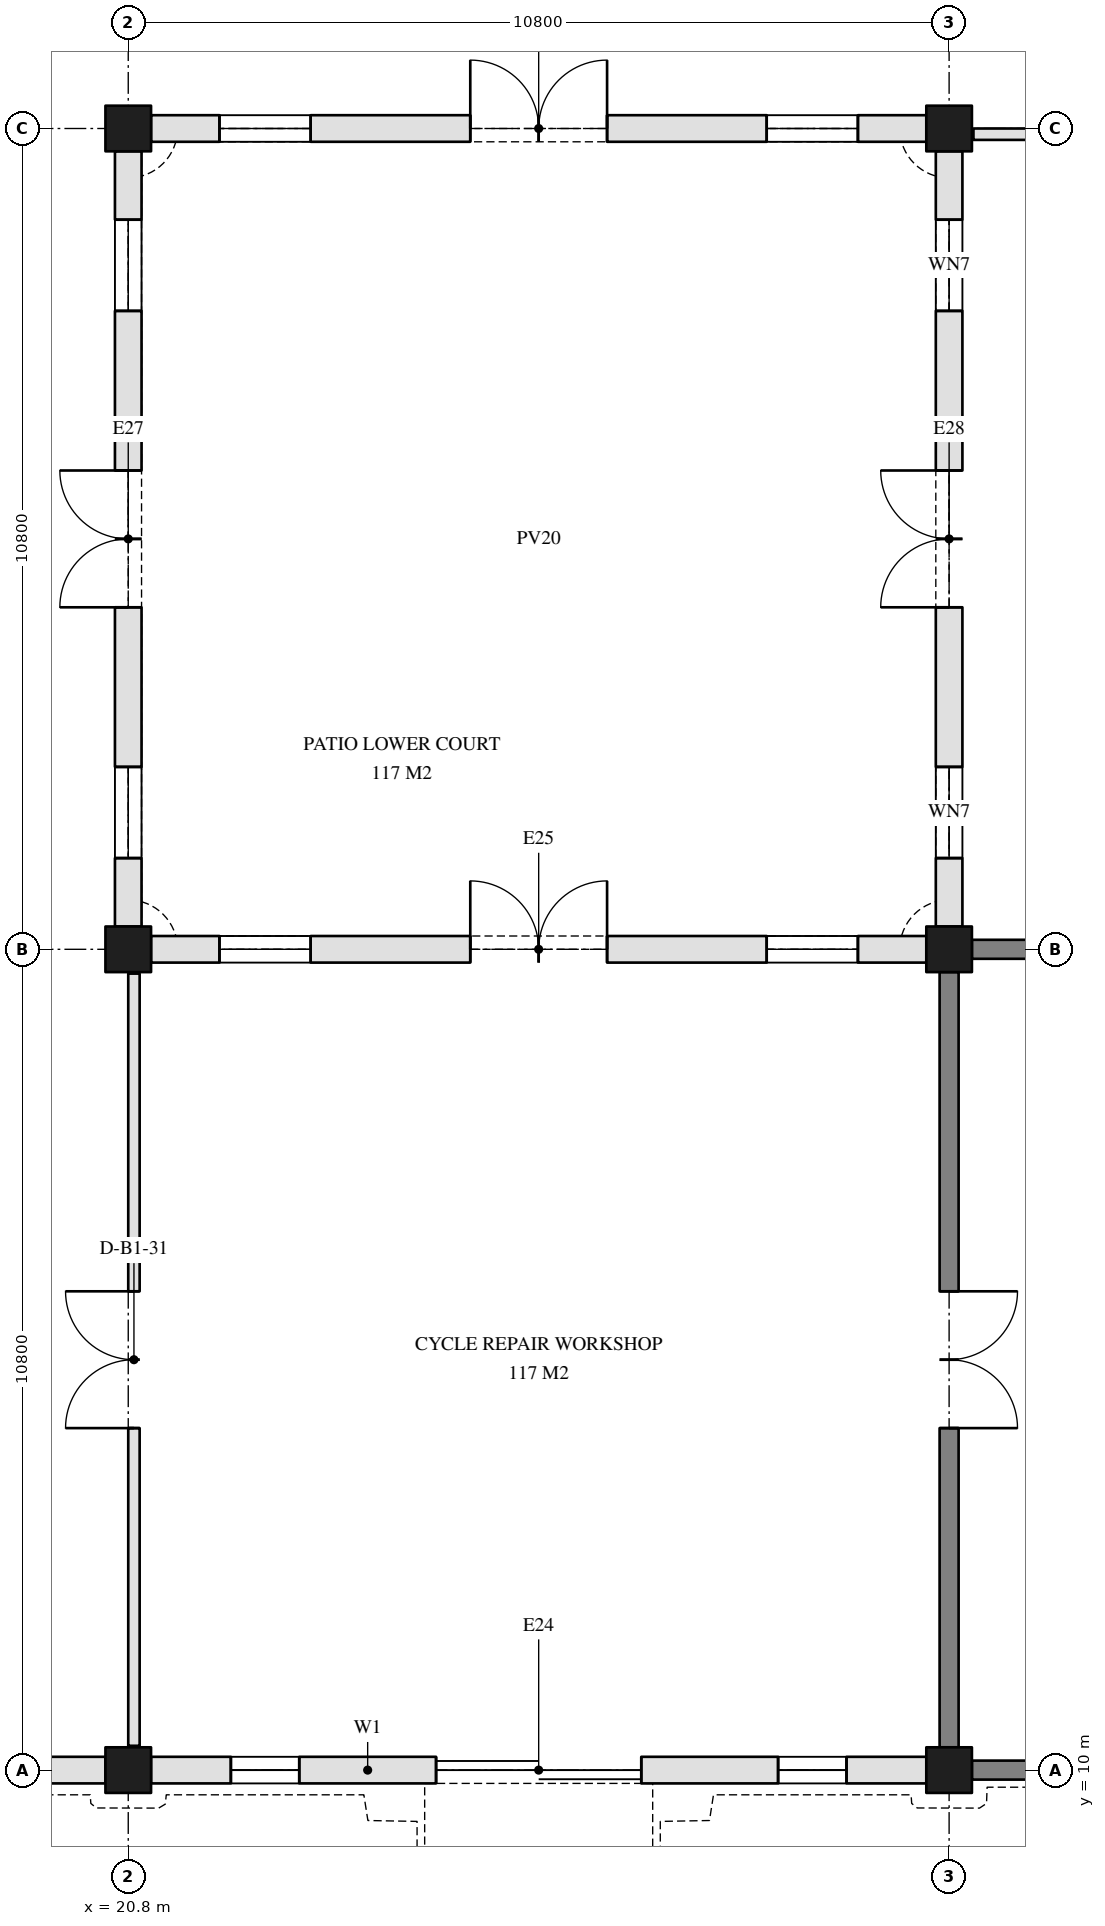
"""IFC4 building model, lengths in metres.
Left out: names, types, materials, properties, quantities, classifications, styles, units other than length and angle.
Written with IfcOpenShell. Run it as: python <this file> out.ifc"""

import sys

from ifc_helpers import new_model, si_unit, direction, frame, frame_2d, origin, origin_2d, place, context, subcontext, project, spatial, rectangle, extrude, element, fill, save


model = new_model("IFC4")
c1 = context("Model", 3, precision=1e-05, world=origin(), true_north=direction((0.0, 1.0)))
c2 = subcontext(c1, "Body", "Model", "MODEL_VIEW")
j1 = project(units=[si_unit("LENGTHUNIT", "METRE"), si_unit("PLANEANGLEUNIT", "RADIAN")], contexts=[c1])
p1 = place(None, origin())
s1 = spatial("IfcSite", under=j1, at=p1, CompositionType="ELEMENT")
p2 = place(p1, origin())
s2 = spatial("IfcBuilding", under=s1, at=p2, CompositionType="ELEMENT")
p3 = place(p2, frame((0.0, 0.0, -5.4)))
s3 = spatial("IfcBuildingStorey", under=s2, at=p3, CompositionType="ELEMENT", Elevation=-5.4)
for number, where, z_axis, x_axis in (
    (1, (20.8, 10.0, -0.4), (0.0, 0.0, 1.0), (1.0, 0.0, 0.0)),
    (2, (20.8, 20.8, -0.4), (0.0, 0.0, 1.0), (1.0, 0.0, 0.0)),
    (3, (20.8, 31.6, -0.4), (0.0, 0.0, 1.0), (1.0, 0.0, 0.0)),
    (4, (31.6, 10.0, -0.4), (0.0, 0.0, 1.0), (1.0, 0.0, 0.0)),
    (5, (31.6, 20.8, -0.4), (0.0, 0.0, 1.0), (1.0, 0.0, 0.0)),
    (6, (31.6, 31.6, -0.4), (0.0, 0.0, 1.0), (1.0, 0.0, 0.0)),
):
    element("IfcColumn", number, at=place(p3, frame(where, z_axis=z_axis, x_axis=x_axis)), inside=s3, PredefinedType="COLUMN", context=c2, shape_type="SweptSolid", body=[
        extrude(rectangle(XDim=0.6, YDim=0.6, at=origin_2d()), origin(), (0.0, 0.0, 1.0), 5.8),
    ])
for number, where, z_axis, x_axis in (
    (7, (31.9, 10.0, 0.0), (0.0, 0.0, 1.0), (1.0, 0.0, 0.0)),
    (8, (42.0, 20.8, 0.0), (0.0, 0.0, 1.0), (-1.0, 0.0, 0.0)),
):
    element("IfcWall", number, at=place(p3, frame(where, z_axis=z_axis, x_axis=x_axis)), inside=s3, PredefinedType="SOLIDWALL", context=c2, shape_type="SweptSolid", body=[
        extrude(rectangle(XDim=10.1, YDim=0.25, at=frame_2d((5.05, 0.0))), origin(), (0.0, 0.0, 1.0), 5.4),
    ])
p4 = place(p3, frame((31.6, 20.5, 0.0), z_axis=(0.0, 0.0, 1.0), x_axis=(0.0, -1.0, 0.0)))
e9 = element("IfcWall", 9, at=p4, inside=s3, PredefinedType="SOLIDWALL", context=c2, shape_type="SweptSolid", body=[
    extrude(rectangle(XDim=10.2, YDim=0.25, at=frame_2d((5.1, 0.0))), origin(), (0.0, 0.0, 1.0), 5.4),
])
p5 = place(p4, frame((4.2, 0.0, 0.0)))
e10 = element("IfcOpeningElement", 10, at=p5, cuts=e9, PredefinedType="OPENING", context=c2, shape_type="SweptSolid", body=[
    extrude(rectangle(XDim=1.8, YDim=2.1, at=frame_2d((0.9, 1.05))), frame((0.0, 0.135, 0.0), z_axis=(0.0, -1.0, 0.0), x_axis=(1.0, 0.0, 0.0)), (0.0, 0.0, 1.0), 0.27),
])
p6 = place(p3, frame((10.3, 10.0, 0.0), z_axis=(0.0, 0.0, 1.0), x_axis=(1.0, 0.0, 0.0)))
e11 = element("IfcWall", 11, at=p6, inside=s3, PredefinedType="SOLIDWALL", context=c2, shape_type="SweptSolid", body=[
    extrude(rectangle(XDim=10.2, YDim=0.35, at=frame_2d((5.1, 0.0))), origin(), (0.0, 0.0, 1.0), 3.9),
])
p7 = place(p6, frame((1.05, 0.0, 1.5)))
e12 = element("IfcOpeningElement", 12, at=p7, cuts=e11, PredefinedType="OPENING", context=c2, shape_type="SweptSolid", body=[
    extrude(rectangle(XDim=0.9, YDim=1.2, at=frame_2d((0.45, 0.6))), frame((0.0, 0.185, 0.0), z_axis=(0.0, -1.0, 0.0), x_axis=(1.0, 0.0, 0.0)), (0.0, 0.0, 1.0), 0.37),
])
p8 = place(p6, frame((4.65, 0.0, 1.5)))
e13 = element("IfcOpeningElement", 13, at=p8, cuts=e11, PredefinedType="OPENING", context=c2, shape_type="SweptSolid", body=[
    extrude(rectangle(XDim=0.9, YDim=1.2, at=frame_2d((0.45, 0.6))), frame((0.0, 0.185, 0.0), z_axis=(0.0, -1.0, 0.0), x_axis=(1.0, 0.0, 0.0)), (0.0, 0.0, 1.0), 0.37),
])
p9 = place(p6, frame((8.25, 0.0, 1.5)))
e14 = element("IfcOpeningElement", 14, at=p9, cuts=e11, PredefinedType="OPENING", context=c2, shape_type="SweptSolid", body=[
    extrude(rectangle(XDim=0.9, YDim=1.2, at=frame_2d((0.45, 0.6))), frame((0.0, 0.185, 0.0), z_axis=(0.0, -1.0, 0.0), x_axis=(1.0, 0.0, 0.0)), (0.0, 0.0, 1.0), 0.37),
])
p10 = place(p3, frame((21.1, 10.0, 0.0), z_axis=(0.0, 0.0, 1.0), x_axis=(1.0, 0.0, 0.0)))
e15 = element("IfcWall", 15, at=p10, inside=s3, PredefinedType="SOLIDWALL", context=c2, shape_type="SweptSolid", body=[
    extrude(rectangle(XDim=10.2, YDim=0.35, at=frame_2d((5.1, 0.0))), origin(), (0.0, 0.0, 1.0), 3.9),
])
p11 = place(p10, frame((1.05, 0.0, 1.5)))
e16 = element("IfcOpeningElement", 16, at=p11, cuts=e15, PredefinedType="OPENING", context=c2, shape_type="SweptSolid", body=[
    extrude(rectangle(XDim=0.9, YDim=1.2, at=frame_2d((0.45, 0.6))), frame((0.0, 0.185, 0.0), z_axis=(0.0, -1.0, 0.0), x_axis=(1.0, 0.0, 0.0)), (0.0, 0.0, 1.0), 0.37),
])
p12 = place(p10, frame((3.75, 0.0, 0.0)))
e17 = element("IfcOpeningElement", 17, at=p12, cuts=e15, PredefinedType="OPENING", context=c2, shape_type="SweptSolid", body=[
    extrude(rectangle(XDim=2.7, YDim=2.4, at=frame_2d((1.35, 1.2))), frame((0.0, 0.185, 0.0), z_axis=(0.0, -1.0, 0.0), x_axis=(1.0, 0.0, 0.0)), (0.0, 0.0, 1.0), 0.37),
])
p13 = place(p10, frame((8.25, 0.0, 1.5)))
e18 = element("IfcOpeningElement", 18, at=p13, cuts=e15, PredefinedType="OPENING", context=c2, shape_type="SweptSolid", body=[
    extrude(rectangle(XDim=0.9, YDim=1.2, at=frame_2d((0.45, 0.6))), frame((0.0, 0.185, 0.0), z_axis=(0.0, -1.0, 0.0), x_axis=(1.0, 0.0, 0.0)), (0.0, 0.0, 1.0), 0.37),
])
p14 = place(p3, frame((21.1, 20.8, 0.0), z_axis=(0.0, 0.0, 1.0), x_axis=(1.0, 0.0, 0.0)))
e19 = element("IfcWall", 19, at=p14, inside=s3, PredefinedType="SOLIDWALL", context=c2, shape_type="SweptSolid", body=[
    extrude(rectangle(XDim=10.2, YDim=0.35, at=frame_2d((5.1, 0.0))), origin(), (0.0, 0.0, 1.0), 3.6),
])
p15 = place(p14, frame((0.9, 0.0, 0.9)))
e20 = element("IfcOpeningElement", 20, at=p15, cuts=e19, PredefinedType="OPENING", context=c2, shape_type="SweptSolid", body=[
    extrude(rectangle(XDim=1.2, YDim=1.5, at=frame_2d((0.6, 0.75))), frame((0.0, 0.185, 0.0), z_axis=(0.0, -1.0, 0.0), x_axis=(1.0, 0.0, 0.0)), (0.0, 0.0, 1.0), 0.37),
])
p16 = place(p14, frame((4.2, 0.0, 0.0)))
e21 = element("IfcOpeningElement", 21, at=p16, cuts=e19, PredefinedType="OPENING", context=c2, shape_type="SweptSolid", body=[
    extrude(rectangle(XDim=1.8, YDim=2.4, at=frame_2d((0.9, 1.2))), frame((0.0, 0.185, 0.0), z_axis=(0.0, -1.0, 0.0), x_axis=(1.0, 0.0, 0.0)), (0.0, 0.0, 1.0), 0.37),
])
p17 = place(p14, frame((8.1, 0.0, 0.9)))
e22 = element("IfcOpeningElement", 22, at=p17, cuts=e19, PredefinedType="OPENING", context=c2, shape_type="SweptSolid", body=[
    extrude(rectangle(XDim=1.2, YDim=1.5, at=frame_2d((0.6, 0.75))), frame((0.0, 0.185, 0.0), z_axis=(0.0, -1.0, 0.0), x_axis=(1.0, 0.0, 0.0)), (0.0, 0.0, 1.0), 0.37),
])
p18 = place(p3, frame((21.1, 31.6, 0.0), z_axis=(0.0, 0.0, 1.0), x_axis=(1.0, 0.0, 0.0)))
e23 = element("IfcWall", 23, at=p18, inside=s3, PredefinedType="SOLIDWALL", context=c2, shape_type="SweptSolid", body=[
    extrude(rectangle(XDim=10.2, YDim=0.35, at=frame_2d((5.1, 0.0))), origin(), (0.0, 0.0, 1.0), 3.6),
])
p19 = place(p18, frame((0.9, 0.0, 0.9)))
e24 = element("IfcOpeningElement", 24, at=p19, cuts=e23, PredefinedType="OPENING", context=c2, shape_type="SweptSolid", body=[
    extrude(rectangle(XDim=1.2, YDim=1.5, at=frame_2d((0.6, 0.75))), frame((0.0, 0.185, 0.0), z_axis=(0.0, -1.0, 0.0), x_axis=(1.0, 0.0, 0.0)), (0.0, 0.0, 1.0), 0.37),
])
p20 = place(p18, frame((4.2, 0.0, 0.0)))
e25 = element("IfcOpeningElement", 25, at=p20, cuts=e23, PredefinedType="OPENING", context=c2, shape_type="SweptSolid", body=[
    extrude(rectangle(XDim=1.8, YDim=2.4, at=frame_2d((0.9, 1.2))), frame((0.0, 0.185, 0.0), z_axis=(0.0, -1.0, 0.0), x_axis=(1.0, 0.0, 0.0)), (0.0, 0.0, 1.0), 0.37),
])
p21 = place(p18, frame((8.1, 0.0, 0.9)))
e26 = element("IfcOpeningElement", 26, at=p21, cuts=e23, PredefinedType="OPENING", context=c2, shape_type="SweptSolid", body=[
    extrude(rectangle(XDim=1.2, YDim=1.5, at=frame_2d((0.6, 0.75))), frame((0.0, 0.185, 0.0), z_axis=(0.0, -1.0, 0.0), x_axis=(1.0, 0.0, 0.0)), (0.0, 0.0, 1.0), 0.37),
])
p22 = place(p3, frame((20.8, 21.1, 0.0), z_axis=(0.0, 0.0, 1.0), x_axis=(0.0, 1.0, 0.0)))
e27 = element("IfcWall", 27, at=p22, inside=s3, PredefinedType="SOLIDWALL", context=c2, shape_type="SweptSolid", body=[
    extrude(rectangle(XDim=10.2, YDim=0.35, at=frame_2d((5.1, 0.0))), origin(), (0.0, 0.0, 1.0), 3.6),
])
p23 = place(p22, frame((0.9, 0.0, 0.9)))
e28 = element("IfcOpeningElement", 28, at=p23, cuts=e27, PredefinedType="OPENING", context=c2, shape_type="SweptSolid", body=[
    extrude(rectangle(XDim=1.2, YDim=1.5, at=frame_2d((0.6, 0.75))), frame((0.0, 0.185, 0.0), z_axis=(0.0, -1.0, 0.0), x_axis=(1.0, 0.0, 0.0)), (0.0, 0.0, 1.0), 0.37),
])
p24 = place(p22, frame((4.2, 0.0, 0.0)))
e29 = element("IfcOpeningElement", 29, at=p24, cuts=e27, PredefinedType="OPENING", context=c2, shape_type="SweptSolid", body=[
    extrude(rectangle(XDim=1.8, YDim=2.4, at=frame_2d((0.9, 1.2))), frame((0.0, 0.185, 0.0), z_axis=(0.0, -1.0, 0.0), x_axis=(1.0, 0.0, 0.0)), (0.0, 0.0, 1.0), 0.37),
])
p25 = place(p22, frame((8.1, 0.0, 0.9)))
e30 = element("IfcOpeningElement", 30, at=p25, cuts=e27, PredefinedType="OPENING", context=c2, shape_type="SweptSolid", body=[
    extrude(rectangle(XDim=1.2, YDim=1.5, at=frame_2d((0.6, 0.75))), frame((0.0, 0.185, 0.0), z_axis=(0.0, -1.0, 0.0), x_axis=(1.0, 0.0, 0.0)), (0.0, 0.0, 1.0), 0.37),
])
p26 = place(p3, frame((31.6, 21.1, 0.0), z_axis=(0.0, 0.0, 1.0), x_axis=(0.0, 1.0, 0.0)))
e31 = element("IfcWall", 31, at=p26, inside=s3, PredefinedType="SOLIDWALL", context=c2, shape_type="SweptSolid", body=[
    extrude(rectangle(XDim=10.2, YDim=0.35, at=frame_2d((5.1, 0.0))), origin(), (0.0, 0.0, 1.0), 3.6),
])
p27 = place(p26, frame((0.9, 0.0, 0.9)))
e32 = element("IfcOpeningElement", 32, at=p27, cuts=e31, PredefinedType="OPENING", context=c2, shape_type="SweptSolid", body=[
    extrude(rectangle(XDim=1.2, YDim=1.5, at=frame_2d((0.6, 0.75))), frame((0.0, 0.185, 0.0), z_axis=(0.0, -1.0, 0.0), x_axis=(1.0, 0.0, 0.0)), (0.0, 0.0, 1.0), 0.37),
])
p28 = place(p26, frame((4.2, 0.0, 0.0)))
e33 = element("IfcOpeningElement", 33, at=p28, cuts=e31, PredefinedType="OPENING", context=c2, shape_type="SweptSolid", body=[
    extrude(rectangle(XDim=1.8, YDim=2.4, at=frame_2d((0.9, 1.2))), frame((0.0, 0.185, 0.0), z_axis=(0.0, -1.0, 0.0), x_axis=(1.0, 0.0, 0.0)), (0.0, 0.0, 1.0), 0.37),
])
p29 = place(p26, frame((8.1, 0.0, 0.9)))
e34 = element("IfcOpeningElement", 34, at=p29, cuts=e31, PredefinedType="OPENING", context=c2, shape_type="SweptSolid", body=[
    extrude(rectangle(XDim=1.2, YDim=1.5, at=frame_2d((0.6, 0.75))), frame((0.0, 0.185, 0.0), z_axis=(0.0, -1.0, 0.0), x_axis=(1.0, 0.0, 0.0)), (0.0, 0.0, 1.0), 0.37),
])
p30 = place(p3, frame((20.875, 10.32, 0.0), z_axis=(0.0, 0.0, 1.0), x_axis=(0.0, 1.0, 0.0)))
e35 = element("IfcWall", 35, at=p30, inside=s3, PredefinedType="PARTITIONING", context=c2, shape_type="SweptSolid", body=[
    extrude(rectangle(XDim=10.16, YDim=0.15, at=frame_2d((5.08, 0.0))), origin(), (0.0, 0.0, 1.0), 3.6),
])
p31 = place(p30, frame((4.18, 0.0, 0.0)))
e36 = element("IfcOpeningElement", 36, at=p31, cuts=e35, PredefinedType="OPENING", context=c2, shape_type="SweptSolid", body=[
    extrude(rectangle(XDim=1.8, YDim=2.1, at=frame_2d((0.9, 1.05))), frame((0.0, 0.085, 0.0), z_axis=(0.0, -1.0, 0.0), x_axis=(1.0, 0.0, 0.0)), (0.0, 0.0, 1.0), 0.17),
])
p32 = place(p3, frame((31.92, 31.525, 0.0), z_axis=(0.0, 0.0, 1.0), x_axis=(1.0, 0.0, 0.0)))
e37 = element("IfcWall", 37, at=p32, inside=s3, PredefinedType="PARTITIONING", context=c2, shape_type="SweptSolid", body=[
    extrude(rectangle(XDim=10.06, YDim=0.15, at=frame_2d((5.03, 0.0))), origin(), (0.0, 0.0, 1.0), 3.6),
])
p33 = place(p32, frame((4.13, 0.0, 0.0)))
e38 = element("IfcOpeningElement", 38, at=p33, cuts=e37, PredefinedType="OPENING", context=c2, shape_type="SweptSolid", body=[
    extrude(rectangle(XDim=1.8, YDim=2.1, at=frame_2d((0.9, 1.05))), frame((0.0, 0.085, 0.0), z_axis=(0.0, -1.0, 0.0), x_axis=(1.0, 0.0, 0.0)), (0.0, 0.0, 1.0), 0.17),
])
p34 = place(p11, origin())
e39 = element("IfcWindow", 39, at=p34, inside=s3, PartitioningType="SINGLE_PANEL", PredefinedType="WINDOW", context=c2, shape_type="SweptSolid", body=[
    extrude(rectangle(XDim=0.9, YDim=1.2, at=frame_2d((0.45, 0.6))), frame((0.0, 0.03, 0.0), z_axis=(0.0, -1.0, 0.0), x_axis=(1.0, 0.0, 0.0)), (0.0, 0.0, 1.0), 0.06),
])
fill(e16, e39)
p35 = place(p12, origin())
e40 = element("IfcDoor", 40, at=p35, inside=s3, OperationType="DOUBLE_DOOR_SLIDING", PredefinedType="DOOR", context=c2, shape_type="SweptSolid", body=[
    extrude(rectangle(XDim=2.7, YDim=2.4, at=frame_2d((1.35, 1.2))), frame((0.0, 0.025, 0.0), z_axis=(0.0, -1.0, 0.0), x_axis=(1.0, 0.0, 0.0)), (0.0, 0.0, 1.0), 0.05),
])
fill(e17, e40)
p36 = place(p13, origin())
e41 = element("IfcWindow", 41, at=p36, inside=s3, PartitioningType="SINGLE_PANEL", PredefinedType="WINDOW", context=c2, shape_type="SweptSolid", body=[
    extrude(rectangle(XDim=0.9, YDim=1.2, at=frame_2d((0.45, 0.6))), frame((0.0, 0.03, 0.0), z_axis=(0.0, -1.0, 0.0), x_axis=(1.0, 0.0, 0.0)), (0.0, 0.0, 1.0), 0.06),
])
fill(e18, e41)
p37 = place(p15, origin())
e42 = element("IfcWindow", 42, at=p37, inside=s3, PartitioningType="SINGLE_PANEL", PredefinedType="WINDOW", context=c2, shape_type="SweptSolid", body=[
    extrude(rectangle(XDim=1.2, YDim=1.5, at=frame_2d((0.6, 0.75))), frame((0.0, 0.03, 0.0), z_axis=(0.0, -1.0, 0.0), x_axis=(1.0, 0.0, 0.0)), (0.0, 0.0, 1.0), 0.06),
])
fill(e20, e42)
p38 = place(p16, origin())
e43 = element("IfcDoor", 43, at=p38, inside=s3, OperationType="DOUBLE_DOOR_DOUBLE_SWING", PredefinedType="DOOR", context=c2, shape_type="SweptSolid", body=[
    extrude(rectangle(XDim=1.8, YDim=2.4, at=frame_2d((0.9, 1.2))), frame((0.0, 0.025, 0.0), z_axis=(0.0, -1.0, 0.0), x_axis=(1.0, 0.0, 0.0)), (0.0, 0.0, 1.0), 0.05),
])
fill(e21, e43)
p39 = place(p17, origin())
e44 = element("IfcWindow", 44, at=p39, inside=s3, PartitioningType="SINGLE_PANEL", PredefinedType="WINDOW", context=c2, shape_type="SweptSolid", body=[
    extrude(rectangle(XDim=1.2, YDim=1.5, at=frame_2d((0.6, 0.75))), frame((0.0, 0.03, 0.0), z_axis=(0.0, -1.0, 0.0), x_axis=(1.0, 0.0, 0.0)), (0.0, 0.0, 1.0), 0.06),
])
fill(e22, e44)
p40 = place(p19, origin())
e45 = element("IfcWindow", 45, at=p40, inside=s3, PartitioningType="SINGLE_PANEL", PredefinedType="WINDOW", context=c2, shape_type="SweptSolid", body=[
    extrude(rectangle(XDim=1.2, YDim=1.5, at=frame_2d((0.6, 0.75))), frame((0.0, 0.03, 0.0), z_axis=(0.0, -1.0, 0.0), x_axis=(1.0, 0.0, 0.0)), (0.0, 0.0, 1.0), 0.06),
])
fill(e24, e45)
p41 = place(p20, origin())
e46 = element("IfcDoor", 46, at=p41, inside=s3, OperationType="DOUBLE_DOOR_DOUBLE_SWING", PredefinedType="DOOR", context=c2, shape_type="SweptSolid", body=[
    extrude(rectangle(XDim=1.8, YDim=2.4, at=frame_2d((0.9, 1.2))), frame((0.0, 0.025, 0.0), z_axis=(0.0, -1.0, 0.0), x_axis=(1.0, 0.0, 0.0)), (0.0, 0.0, 1.0), 0.05),
])
fill(e25, e46)
p42 = place(p21, origin())
e47 = element("IfcWindow", 47, at=p42, inside=s3, PartitioningType="SINGLE_PANEL", PredefinedType="WINDOW", context=c2, shape_type="SweptSolid", body=[
    extrude(rectangle(XDim=1.2, YDim=1.5, at=frame_2d((0.6, 0.75))), frame((0.0, 0.03, 0.0), z_axis=(0.0, -1.0, 0.0), x_axis=(1.0, 0.0, 0.0)), (0.0, 0.0, 1.0), 0.06),
])
fill(e26, e47)
p43 = place(p23, origin())
e48 = element("IfcWindow", 48, at=p43, inside=s3, PartitioningType="SINGLE_PANEL", PredefinedType="WINDOW", context=c2, shape_type="SweptSolid", body=[
    extrude(rectangle(XDim=1.2, YDim=1.5, at=frame_2d((0.6, 0.75))), frame((0.0, 0.03, 0.0), z_axis=(0.0, -1.0, 0.0), x_axis=(1.0, 0.0, 0.0)), (0.0, 0.0, 1.0), 0.06),
])
fill(e28, e48)
p44 = place(p24, origin())
e49 = element("IfcDoor", 49, at=p44, inside=s3, OperationType="DOUBLE_DOOR_DOUBLE_SWING", PredefinedType="DOOR", context=c2, shape_type="SweptSolid", body=[
    extrude(rectangle(XDim=1.8, YDim=2.4, at=frame_2d((0.9, 1.2))), frame((0.0, 0.025, 0.0), z_axis=(0.0, -1.0, 0.0), x_axis=(1.0, 0.0, 0.0)), (0.0, 0.0, 1.0), 0.05),
])
fill(e29, e49)
p45 = place(p25, origin())
e50 = element("IfcWindow", 50, at=p45, inside=s3, PartitioningType="SINGLE_PANEL", PredefinedType="WINDOW", context=c2, shape_type="SweptSolid", body=[
    extrude(rectangle(XDim=1.2, YDim=1.5, at=frame_2d((0.6, 0.75))), frame((0.0, 0.03, 0.0), z_axis=(0.0, -1.0, 0.0), x_axis=(1.0, 0.0, 0.0)), (0.0, 0.0, 1.0), 0.06),
])
fill(e30, e50)
p46 = place(p27, origin())
e51 = element("IfcWindow", 51, at=p46, inside=s3, PartitioningType="SINGLE_PANEL", PredefinedType="WINDOW", context=c2, shape_type="SweptSolid", body=[
    extrude(rectangle(XDim=1.2, YDim=1.5, at=frame_2d((0.6, 0.75))), frame((0.0, 0.03, 0.0), z_axis=(0.0, -1.0, 0.0), x_axis=(1.0, 0.0, 0.0)), (0.0, 0.0, 1.0), 0.06),
])
fill(e32, e51)
p47 = place(p28, origin())
e52 = element("IfcDoor", 52, at=p47, inside=s3, OperationType="DOUBLE_DOOR_DOUBLE_SWING", PredefinedType="DOOR", context=c2, shape_type="SweptSolid", body=[
    extrude(rectangle(XDim=1.8, YDim=2.4, at=frame_2d((0.9, 1.2))), frame((0.0, 0.025, 0.0), z_axis=(0.0, -1.0, 0.0), x_axis=(1.0, 0.0, 0.0)), (0.0, 0.0, 1.0), 0.05),
])
fill(e33, e52)
p48 = place(p29, origin())
e53 = element("IfcWindow", 53, at=p48, inside=s3, PartitioningType="SINGLE_PANEL", PredefinedType="WINDOW", context=c2, shape_type="SweptSolid", body=[
    extrude(rectangle(XDim=1.2, YDim=1.5, at=frame_2d((0.6, 0.75))), frame((0.0, 0.03, 0.0), z_axis=(0.0, -1.0, 0.0), x_axis=(1.0, 0.0, 0.0)), (0.0, 0.0, 1.0), 0.06),
])
fill(e34, e53)
p49 = place(p5, frame((1.8, 0.0, 0.0), z_axis=(0.0, 0.0, 1.0), x_axis=(-1.0, 0.0, 0.0)))
e54 = element("IfcDoor", 54, at=p49, inside=s3, OperationType="DOUBLE_DOOR_DOUBLE_SWING", PredefinedType="DOOR", context=c2, shape_type="SweptSolid", body=[
    extrude(rectangle(XDim=1.8, YDim=2.1, at=frame_2d((0.9, 1.05))), frame((0.0, 0.025, 0.0), z_axis=(0.0, -1.0, 0.0), x_axis=(1.0, 0.0, 0.0)), (0.0, 0.0, 1.0), 0.05),
])
fill(e10, e54)
p50 = place(p31, frame((1.8, 0.0, 0.0), z_axis=(0.0, 0.0, 1.0), x_axis=(-1.0, 0.0, 0.0)))
e55 = element("IfcDoor", 55, at=p50, inside=s3, OperationType="DOUBLE_DOOR_DOUBLE_SWING", PredefinedType="DOOR", context=c2, shape_type="SweptSolid", body=[
    extrude(rectangle(XDim=1.8, YDim=2.1, at=frame_2d((0.9, 1.05))), frame((0.0, 0.025, 0.0), z_axis=(0.0, -1.0, 0.0), x_axis=(1.0, 0.0, 0.0)), (0.0, 0.0, 1.0), 0.05),
])
fill(e36, e55)
save(model, sys.argv[1])
